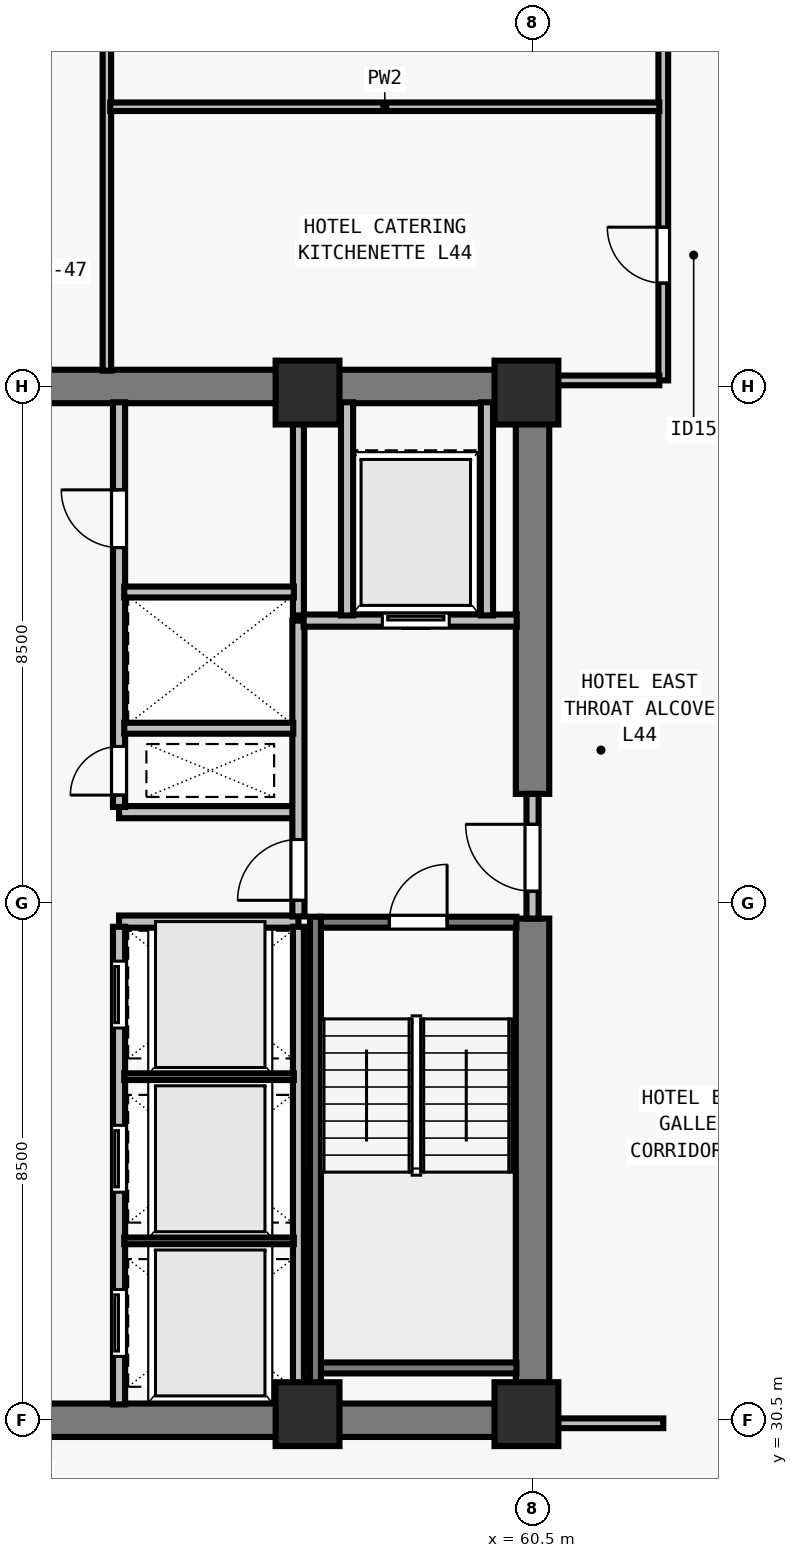
"""IFC4 building model, lengths in metres.
Left out: names, types, materials, properties, quantities, classifications, styles, units other than length and angle.
Written with IfcOpenShell. Run it as: python <this file> out.ifc"""

import sys

from ifc_helpers import new_model, si_unit, direction, frame, frame_2d, origin, origin_2d, place, context, subcontext, project, spatial, rectangle, extrude, element, fill, save


model = new_model("IFC4")
c1 = context("Model", 3, precision=1e-05, world=origin(), true_north=direction((0.0, 1.0)))
c2 = subcontext(c1, "Body", "Model", "MODEL_VIEW")
j1 = project(units=[si_unit("LENGTHUNIT", "METRE"), si_unit("PLANEANGLEUNIT", "RADIAN")], contexts=[c1])
p1 = place(None, origin())
s1 = spatial("IfcSite", under=j1, at=p1, CompositionType="ELEMENT")
p2 = place(p1, origin())
s2 = spatial("IfcBuilding", under=s1, at=p2, CompositionType="ELEMENT")
p3 = place(p2, frame((0.0, 0.0, 162.0)))
s3 = spatial("IfcBuildingStorey", under=s2, at=p3, CompositionType="ELEMENT", Elevation=162.0)
for number, where, z_axis, x_axis in (
    (1, (56.8, 30.6, 0.0), (0.0, 0.0, 1.0), (1.0, 0.0, 0.0)),
    (2, (60.4, 30.6, 0.0), (0.0, 0.0, 1.0), (1.0, 0.0, 0.0)),
    (3, (56.8, 47.4, 0.0), (0.0, 0.0, 1.0), (1.0, 0.0, 0.0)),
    (4, (60.4, 47.4, 0.0), (0.0, 0.0, 1.0), (1.0, 0.0, 0.0)),
):
    element("IfcColumn", number, at=place(p3, frame(where, z_axis=z_axis, x_axis=x_axis)), inside=s3, PredefinedType="COLUMN", context=c2, shape_type="SweptSolid", body=[
        extrude(rectangle(XDim=1.05, YDim=1.05, at=origin_2d()), origin(), (0.0, 0.0, 1.0), 3.5),
    ])
for number, where, z_axis, x_axis in (
    (5, (43.225, 30.5, 0.0), (0.0, 0.0, 1.0), (1.0, 0.0, 0.0)),
    (6, (43.225, 47.5, 0.0), (0.0, 0.0, 1.0), (1.0, 0.0, 0.0)),
):
    element("IfcWall", number, at=place(p3, frame(where, z_axis=z_axis, x_axis=x_axis)), inside=s3, PredefinedType="SHEAR", context=c2, shape_type="SweptSolid", body=[
        extrude(rectangle(XDim=17.55, YDim=0.55, at=frame_2d((8.775, 0.0))), origin(), (0.0, 0.0, 1.0), 3.28),
    ])
p4 = place(p3, frame((60.5, 30.765, 0.0), z_axis=(0.0, 0.0, 1.0), x_axis=(0.0, 1.0, 0.0)))
e7 = element("IfcWall", 7, at=p4, inside=s3, PredefinedType="SHEAR", context=c2, shape_type="SweptSolid", body=[
    extrude(rectangle(XDim=7.985, YDim=0.55, at=frame_2d((3.993, 0.0))), origin(), (0.0, 0.0, 1.0), 3.28),
])
p5 = place(p3, frame((60.5, 40.8, 0.0), z_axis=(0.0, 0.0, 1.0), x_axis=(0.0, 1.0, 0.0)))
e8 = element("IfcWall", 8, at=p5, inside=s3, PredefinedType="SHEAR", context=c2, shape_type="SweptSolid", body=[
    extrude(rectangle(XDim=6.435, YDim=0.55, at=frame_2d((3.218, 0.0))), origin(), (0.0, 0.0, 1.0), 3.28),
])
for number, where, z_axis, x_axis in (
    (9, (53.7, 38.7, 0.0), (0.0, 0.0, 1.0), (1.0, 0.0, 0.0)),
    (10, (53.7, 40.5, 0.0), (0.0, 0.0, 1.0), (1.0, 0.0, 0.0)),
):
    element("IfcWall", number, at=place(p3, frame(where, z_axis=z_axis, x_axis=x_axis)), inside=s3, PredefinedType="SOLIDWALL", context=c2, shape_type="SweptSolid", body=[
        extrude(rectangle(XDim=2.95, YDim=0.2, at=frame_2d((1.475, 0.0))), origin(), (0.0, 0.0, 1.0), 3.28),
    ])
p6 = place(p3, frame((53.7, 30.76, 0.0), z_axis=(0.0, 0.0, 1.0), x_axis=(0.0, 1.0, 0.0)))
e11 = element("IfcWall", 11, at=p6, inside=s3, PredefinedType="SOLIDWALL", context=c2, shape_type="SweptSolid", body=[
    extrude(rectangle(XDim=7.855, YDim=0.2, at=frame_2d((3.927, 0.0))), origin(), (0.0, 0.0, 1.0), 3.28),
])
p7 = place(p6, frame((0.79, 0.0, 0.0)))
e12 = element("IfcOpeningElement", 12, at=p7, cuts=e11, PredefinedType="OPENING", context=c2, shape_type="SweptSolid", body=[
    extrude(rectangle(XDim=1.1, YDim=2.2, at=frame_2d((0.55, 1.1))), frame((0.0, 0.11, 0.0), z_axis=(0.0, -1.0, 0.0), x_axis=(1.0, 0.0, 0.0)), (0.0, 0.0, 1.0), 0.22),
])
p8 = place(p6, frame((3.49, 0.0, 0.0)))
e13 = element("IfcOpeningElement", 13, at=p8, cuts=e11, PredefinedType="OPENING", context=c2, shape_type="SweptSolid", body=[
    extrude(rectangle(XDim=1.1, YDim=2.2, at=frame_2d((0.55, 1.1))), frame((0.0, 0.11, 0.0), z_axis=(0.0, -1.0, 0.0), x_axis=(1.0, 0.0, 0.0)), (0.0, 0.0, 1.0), 0.22),
])
p9 = place(p6, frame((6.19, 0.0, 0.0)))
e14 = element("IfcOpeningElement", 14, at=p9, cuts=e11, PredefinedType="OPENING", context=c2, shape_type="SweptSolid", body=[
    extrude(rectangle(XDim=1.1, YDim=2.2, at=frame_2d((0.55, 1.1))), frame((0.0, 0.11, 0.0), z_axis=(0.0, -1.0, 0.0), x_axis=(1.0, 0.0, 0.0)), (0.0, 0.0, 1.0), 0.22),
])
p10 = place(p3, frame((53.7, 40.585, 0.0), z_axis=(0.0, 0.0, 1.0), x_axis=(0.0, 1.0, 0.0)))
e15 = element("IfcWall", 15, at=p10, inside=s3, PredefinedType="SOLIDWALL", context=c2, shape_type="SweptSolid", body=[
    extrude(rectangle(XDim=6.655, YDim=0.2, at=frame_2d((3.328, 0.0))), origin(), (0.0, 0.0, 1.0), 3.28),
])
p11 = place(p10, frame((0.195, 0.0, 0.0)))
e16 = element("IfcOpeningElement", 16, at=p11, cuts=e15, PredefinedType="OPENING", context=c2, shape_type="SweptSolid", body=[
    extrude(rectangle(XDim=0.8, YDim=2.08, at=frame_2d((0.4, 1.04))), frame((0.0, 0.11, 0.0), z_axis=(0.0, -1.0, 0.0), x_axis=(1.0, 0.0, 0.0)), (0.0, 0.0, 1.0), 0.22),
])
p12 = place(p10, frame((4.265, 0.0, 0.0)))
e17 = element("IfcOpeningElement", 17, at=p12, cuts=e15, PredefinedType="OPENING", context=c2, shape_type="SweptSolid", body=[
    extrude(rectangle(XDim=0.95, YDim=2.12, at=frame_2d((0.475, 1.06))), frame((0.0, 0.11, 0.0), z_axis=(0.0, -1.0, 0.0), x_axis=(1.0, 0.0, 0.0)), (0.0, 0.0, 1.0), 0.22),
])
p13 = place(p3, frame((60.5, 38.75, 0.0), z_axis=(0.0, 0.0, 1.0), x_axis=(0.0, 1.0, 0.0)))
e18 = element("IfcWall", 18, at=p13, inside=s3, PredefinedType="SOLIDWALL", context=c2, shape_type="SweptSolid", body=[
    extrude(rectangle(XDim=2.05, YDim=0.2, at=frame_2d((1.025, 0.0))), origin(), (0.0, 0.0, 1.0), 3.28),
])
p14 = place(p13, frame((0.45, 0.0, 0.0)))
e19 = element("IfcOpeningElement", 19, at=p14, cuts=e18, PredefinedType="OPENING", context=c2, shape_type="SweptSolid", body=[
    extrude(rectangle(XDim=1.1, YDim=2.15, at=frame_2d((0.55, 1.075))), frame((0.0, 0.11, 0.0), z_axis=(0.0, -1.0, 0.0), x_axis=(1.0, 0.0, 0.0)), (0.0, 0.0, 1.0), 0.22),
])
p15 = place(p3, frame((56.65, 38.785, 0.0), z_axis=(0.0, 0.0, 1.0), x_axis=(0.0, 1.0, 0.0)))
e20 = element("IfcWall", 20, at=p15, inside=s3, PredefinedType="SOLIDWALL", context=c2, shape_type="SweptSolid", body=[
    extrude(rectangle(XDim=4.865, YDim=0.2, at=frame_2d((2.433, 0.0))), origin(), (0.0, 0.0, 1.0), 3.28),
])
p16 = place(p15, frame((0.265, 0.0, 0.0)))
e21 = element("IfcOpeningElement", 21, at=p16, cuts=e20, PredefinedType="OPENING", context=c2, shape_type="SweptSolid", body=[
    extrude(rectangle(XDim=1.0, YDim=2.15, at=frame_2d((0.5, 1.075))), frame((0.0, 0.11, 0.0), z_axis=(0.0, -1.0, 0.0), x_axis=(1.0, 0.0, 0.0)), (0.0, 0.0, 1.0), 0.22),
])
p17 = place(p3, frame((56.735, 43.65, 0.0), z_axis=(0.0, 0.0, 1.0), x_axis=(1.0, 0.0, 0.0)))
e22 = element("IfcWall", 22, at=p17, inside=s3, PredefinedType="SOLIDWALL", context=c2, shape_type="SweptSolid", body=[
    extrude(rectangle(XDim=3.505, YDim=0.2, at=frame_2d((1.752, 0.0))), origin(), (0.0, 0.0, 1.0), 3.28),
])
p18 = place(p17, frame((1.295, 0.0, 0.0)))
e23 = element("IfcOpeningElement", 23, at=p18, cuts=e22, PredefinedType="OPENING", context=c2, shape_type="SweptSolid", body=[
    extrude(rectangle(XDim=1.1, YDim=2.2, at=frame_2d((0.55, 1.1))), frame((0.0, 0.11, 0.0), z_axis=(0.0, -1.0, 0.0), x_axis=(1.0, 0.0, 0.0)), (0.0, 0.0, 1.0), 0.22),
])
for number, where, z_axis, x_axis in (
    (24, (57.45, 43.735, 0.0), (0.0, 0.0, 1.0), (0.0, 1.0, 0.0)),
    (25, (59.75, 43.735, 0.0), (0.0, 0.0, 1.0), (0.0, 1.0, 0.0)),
):
    element("IfcWall", number, at=place(p3, frame(where, z_axis=z_axis, x_axis=x_axis)), inside=s3, PredefinedType="SOLIDWALL", context=c2, shape_type="SweptSolid", body=[
        extrude(rectangle(XDim=3.505, YDim=0.2, at=frame_2d((1.752, 0.0))), origin(), (0.0, 0.0, 1.0), 3.28),
    ])
p19 = place(p3, frame((56.65, 30.76, 0.0), z_axis=(0.0, 0.0, 1.0), x_axis=(0.0, 1.0, 0.0)))
e26 = element("IfcWall", 26, at=p19, inside=s3, PredefinedType="SOLIDWALL", context=c2, shape_type="SweptSolid", body=[
    extrude(rectangle(XDim=7.855, YDim=0.18, at=frame_2d((3.927, 0.0))), origin(), (0.0, 0.0, 1.0), 3.28),
])
for number, where, z_axis, x_axis in (
    (27, (53.785, 33.45, 0.0), (0.0, 0.0, 1.0), (1.0, 0.0, 0.0)),
    (28, (53.785, 36.15, 0.0), (0.0, 0.0, 1.0), (1.0, 0.0, 0.0)),
):
    element("IfcWall", number, at=place(p3, frame(where, z_axis=z_axis, x_axis=x_axis)), inside=s3, PredefinedType="PARTITIONING", context=c2, shape_type="SweptSolid", body=[
        extrude(rectangle(XDim=2.79, YDim=0.11, at=frame_2d((1.395, 0.0))), origin(), (0.0, 0.0, 1.0), 3.28),
    ])
p20 = place(p3, frame((56.65, 43.735, 0.0), z_axis=(0.0, 0.0, 1.0), x_axis=(0.0, 1.0, 0.0)))
e29 = element("IfcWall", 29, at=p20, inside=s3, PredefinedType="SOLIDWALL", context=c2, shape_type="SweptSolid", body=[
    extrude(rectangle(XDim=3.505, YDim=0.18, at=frame_2d((1.752, 0.0))), origin(), (0.0, 0.0, 1.0), 3.28),
])
p21 = place(p3, frame((53.785, 41.88, 0.0), z_axis=(0.0, 0.0, 1.0), x_axis=(1.0, 0.0, 0.0)))
e30 = element("IfcWall", 30, at=p21, inside=s3, PredefinedType="SOLIDWALL", context=c2, shape_type="SweptSolid", body=[
    extrude(rectangle(XDim=2.78, YDim=0.18, at=frame_2d((1.39, 0.0))), origin(), (0.0, 0.0, 1.0), 3.28),
])
p22 = place(p3, frame((53.785, 44.12, 0.0), z_axis=(0.0, 0.0, 1.0), x_axis=(1.0, 0.0, 0.0)))
e31 = element("IfcWall", 31, at=p22, inside=s3, PredefinedType="SOLIDWALL", context=c2, shape_type="SweptSolid", body=[
    extrude(rectangle(XDim=2.79, YDim=0.18, at=frame_2d((1.395, 0.0))), origin(), (0.0, 0.0, 1.0), 3.28),
])
p23 = place(p3, frame((62.65, 47.6, 0.0), z_axis=(0.0, 0.0, 1.0), x_axis=(0.0, 1.0, 0.0)))
e32 = element("IfcWall", 32, at=p23, inside=s3, PredefinedType="PARTITIONING", context=c2, shape_type="SweptSolid", body=[
    extrude(rectangle(XDim=15.075, YDim=0.16, at=frame_2d((7.538, 0.0))), origin(), (0.0, 0.0, 1.0), 2.555),
])
p24 = place(p23, frame((1.6, 0.0, 0.0)))
e33 = element("IfcOpeningElement", 33, at=p24, cuts=e32, PredefinedType="OPENING", context=c2, shape_type="SweptSolid", body=[
    extrude(rectangle(XDim=0.92, YDim=2.12, at=frame_2d((0.46, 1.06))), frame((0.0, 0.09, 0.0), z_axis=(0.0, -1.0, 0.0), x_axis=(1.0, 0.0, 0.0)), (0.0, 0.0, 1.0), 0.18),
])
p25 = place(p23, frame((6.2, 0.0, 0.0)))
e34 = element("IfcOpeningElement", 34, at=p25, cuts=e32, PredefinedType="OPENING", context=c2, shape_type="SweptSolid", body=[
    extrude(rectangle(XDim=0.96, YDim=2.12, at=frame_2d((0.48, 1.06))), frame((0.0, 0.09, 0.0), z_axis=(0.0, -1.0, 0.0), x_axis=(1.0, 0.0, 0.0)), (0.0, 0.0, 1.0), 0.18),
])
p26 = place(p3, frame((60.765, 30.45, 0.0), z_axis=(0.0, 0.0, 1.0), x_axis=(1.0, 0.0, 0.0)))
e35 = element("IfcWall", 35, at=p26, inside=s3, PredefinedType="PARTITIONING", context=c2, shape_type="SweptSolid", body=[
    extrude(rectangle(XDim=1.885, YDim=0.16, at=frame_2d((0.942, 0.0))), origin(), (0.0, 0.0, 1.0), 3.28),
])
p27 = place(p3, frame((60.765, 47.6, 0.0), z_axis=(0.0, 0.0, 1.0), x_axis=(1.0, 0.0, 0.0)))
e36 = element("IfcWall", 36, at=p27, inside=s3, PredefinedType="PARTITIONING", context=c2, shape_type="SweptSolid", body=[
    extrude(rectangle(XDim=1.82, YDim=0.16, at=frame_2d((0.91, 0.0))), origin(), (0.0, 0.0, 1.0), 3.28),
])
p28 = place(p3, frame((53.5, 47.76, 0.0), z_axis=(0.0, 0.0, 1.0), x_axis=(0.0, 1.0, 0.0)))
e37 = element("IfcWall", 37, at=p28, inside=s3, PredefinedType="PARTITIONING", context=c2, shape_type="SweptSolid", body=[
    extrude(rectangle(XDim=14.915, YDim=0.14, at=frame_2d((7.458, 0.0))), origin(), (0.0, 0.0, 1.0), 2.896),
])
p29 = place(p3, frame((53.555, 52.1, 0.0), z_axis=(0.0, 0.0, 1.0), x_axis=(1.0, 0.0, 0.0)))
e38 = element("IfcWall", 38, at=p29, inside=s3, PredefinedType="PARTITIONING", context=c2, shape_type="SweptSolid", body=[
    extrude(rectangle(XDim=9.03, YDim=0.14, at=frame_2d((4.515, 0.0))), origin(), (0.0, 0.0, 1.0), 3.28),
])
p30 = place(p3, frame((57.005, 38.69, 0.0), z_axis=(0.0, 0.0, 1.0), x_axis=(1.0, 0.0, 0.0)))
e39 = element("IfcWall", 39, at=p30, inside=s3, PredefinedType="SOLIDWALL", context=c2, shape_type="SweptSolid", body=[
    extrude(rectangle(XDim=3.23, YDim=0.18, at=frame_2d((1.615, 0.0))), origin(), (0.0, 0.0, 1.0), 3.28),
])
p31 = place(p30, frame((1.14, 0.0, 0.0)))
e40 = element("IfcOpeningElement", 40, at=p31, cuts=e39, PredefinedType="OPENING", context=c2, shape_type="SweptSolid", body=[
    extrude(rectangle(XDim=0.95, YDim=2.15, at=frame_2d((0.475, 1.075))), frame((0.0, 0.1, 0.0), z_axis=(0.0, -1.0, 0.0), x_axis=(1.0, 0.0, 0.0)), (0.0, 0.0, 1.0), 0.2),
])
p32 = place(p3, frame((57.005, 31.36, 0.0), z_axis=(0.0, 0.0, 1.0), x_axis=(1.0, 0.0, 0.0)))
e41 = element("IfcWall", 41, at=p32, inside=s3, PredefinedType="SOLIDWALL", context=c2, shape_type="SweptSolid", body=[
    extrude(rectangle(XDim=3.23, YDim=0.18, at=frame_2d((1.615, 0.0))), origin(), (0.0, 0.0, 1.0), 3.28),
])
p33 = place(p3, frame((56.93, 38.78, 0.0), z_axis=(0.0, 0.0, 1.0), x_axis=(0.0, -1.0, 0.0)))
e42 = element("IfcWall", 42, at=p33, inside=s3, PredefinedType="SOLIDWALL", context=c2, shape_type="SweptSolid", body=[
    extrude(rectangle(XDim=8.017, YDim=0.18, at=frame_2d((4.009, 0.0))), origin(), (0.0, 0.0, 1.0), 3.28),
])
p34 = place(p14, origin())
e43 = element("IfcDoor", 43, at=p34, inside=s3, OperationType="SINGLE_SWING_RIGHT", PredefinedType="DOOR", context=c2, shape_type="SweptSolid", body=[
    extrude(rectangle(XDim=1.1, YDim=2.15, at=frame_2d((0.55, 1.075))), frame((0.0, 0.025, 0.0), z_axis=(0.0, -1.0, 0.0), x_axis=(1.0, 0.0, 0.0)), (0.0, 0.0, 1.0), 0.05),
])
fill(e19, e43)
p35 = place(p16, origin())
e44 = element("IfcDoor", 44, at=p35, inside=s3, OperationType="SINGLE_SWING_LEFT", PredefinedType="DOOR", context=c2, shape_type="SweptSolid", body=[
    extrude(rectangle(XDim=1.0, YDim=2.15, at=frame_2d((0.5, 1.075))), frame((0.0, 0.025, 0.0), z_axis=(0.0, -1.0, 0.0), x_axis=(1.0, 0.0, 0.0)), (0.0, 0.0, 1.0), 0.05),
])
fill(e21, e44)
p36 = place(p18, origin())
e45 = element("IfcDoor", 45, at=p36, inside=s3, OperationType="SLIDING_TO_LEFT", PredefinedType="DOOR", context=c2, shape_type="SweptSolid", body=[
    extrude(rectangle(XDim=1.1, YDim=2.2, at=frame_2d((0.55, 1.1))), frame((0.0, 0.025, 0.0), z_axis=(0.0, -1.0, 0.0), x_axis=(1.0, 0.0, 0.0)), (0.0, 0.0, 1.0), 0.05),
])
fill(e23, e45)
p37 = place(p7, origin())
e46 = element("IfcDoor", 46, at=p37, inside=s3, OperationType="SLIDING_TO_LEFT", PredefinedType="DOOR", context=c2, shape_type="SweptSolid", body=[
    extrude(rectangle(XDim=1.1, YDim=2.2, at=frame_2d((0.55, 1.1))), frame((0.0, 0.025, 0.0), z_axis=(0.0, -1.0, 0.0), x_axis=(1.0, 0.0, 0.0)), (0.0, 0.0, 1.0), 0.05),
])
fill(e12, e46)
p38 = place(p8, origin())
e47 = element("IfcDoor", 47, at=p38, inside=s3, OperationType="SLIDING_TO_LEFT", PredefinedType="DOOR", context=c2, shape_type="SweptSolid", body=[
    extrude(rectangle(XDim=1.1, YDim=2.2, at=frame_2d((0.55, 1.1))), frame((0.0, 0.025, 0.0), z_axis=(0.0, -1.0, 0.0), x_axis=(1.0, 0.0, 0.0)), (0.0, 0.0, 1.0), 0.05),
])
fill(e13, e47)
p39 = place(p9, origin())
e48 = element("IfcDoor", 48, at=p39, inside=s3, OperationType="SLIDING_TO_LEFT", PredefinedType="DOOR", context=c2, shape_type="SweptSolid", body=[
    extrude(rectangle(XDim=1.1, YDim=2.2, at=frame_2d((0.55, 1.1))), frame((0.0, 0.025, 0.0), z_axis=(0.0, -1.0, 0.0), x_axis=(1.0, 0.0, 0.0)), (0.0, 0.0, 1.0), 0.05),
])
fill(e14, e48)
p40 = place(p11, origin())
e49 = element("IfcDoor", 49, at=p40, inside=s3, OperationType="SINGLE_SWING_LEFT", PredefinedType="DOOR", context=c2, shape_type="SweptSolid", body=[
    extrude(rectangle(XDim=0.8, YDim=2.08, at=frame_2d((0.4, 1.04))), frame((0.0, 0.025, 0.0), z_axis=(0.0, -1.0, 0.0), x_axis=(1.0, 0.0, 0.0)), (0.0, 0.0, 1.0), 0.05),
])
fill(e16, e49)
p41 = place(p12, origin())
e50 = element("IfcDoor", 50, at=p41, inside=s3, OperationType="SINGLE_SWING_RIGHT", PredefinedType="DOOR", context=c2, shape_type="SweptSolid", body=[
    extrude(rectangle(XDim=0.95, YDim=2.12, at=frame_2d((0.475, 1.06))), frame((0.0, 0.025, 0.0), z_axis=(0.0, -1.0, 0.0), x_axis=(1.0, 0.0, 0.0)), (0.0, 0.0, 1.0), 0.05),
])
fill(e17, e50)
p42 = place(p24, origin())
e51 = element("IfcDoor", 51, at=p42, inside=s3, OperationType="SINGLE_SWING_RIGHT", PredefinedType="DOOR", context=c2, shape_type="SweptSolid", body=[
    extrude(rectangle(XDim=0.92, YDim=2.12, at=frame_2d((0.46, 1.06))), frame((0.0, 0.025, 0.0), z_axis=(0.0, -1.0, 0.0), x_axis=(1.0, 0.0, 0.0)), (0.0, 0.0, 1.0), 0.05),
])
fill(e33, e51)
p43 = place(p31, origin())
e52 = element("IfcDoor", 52, at=p43, inside=s3, OperationType="SINGLE_SWING_RIGHT", PredefinedType="DOOR", context=c2, shape_type="SweptSolid", body=[
    extrude(rectangle(XDim=0.95, YDim=2.15, at=frame_2d((0.475, 1.075))), frame((0.0, 0.025, 0.0), z_axis=(0.0, -1.0, 0.0), x_axis=(1.0, 0.0, 0.0)), (0.0, 0.0, 1.0), 0.05),
])
fill(e40, e52)
save(model, sys.argv[1])
